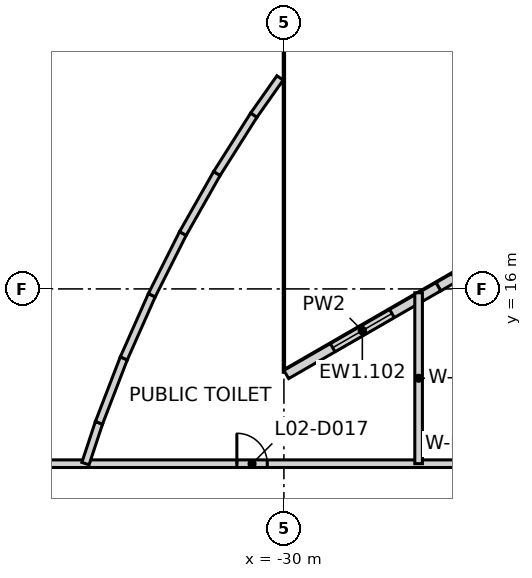
"""IFC4 building model, lengths in metres.
Left out: names, types, materials, properties, quantities, classifications, styles, units other than length and angle.
Written with IfcOpenShell. Run it as: python <this file> out.ifc"""

import sys

from ifc_helpers import new_model, si_unit, direction, frame, frame_2d, origin, place, context, subcontext, project, spatial, rectangle, extrude, element, fill, save


model = new_model("IFC4")
c1 = context("Model", 3, precision=1e-05, world=origin(), true_north=direction((0.0, 1.0)))
c2 = subcontext(c1, "Body", "Model", "MODEL_VIEW")
j1 = project(units=[si_unit("LENGTHUNIT", "METRE"), si_unit("PLANEANGLEUNIT", "RADIAN")], contexts=[c1])
p1 = place(None, origin())
s1 = spatial("IfcSite", under=j1, at=p1, CompositionType="ELEMENT")
p2 = place(p1, origin())
s2 = spatial("IfcBuilding", under=s1, at=p2, CompositionType="ELEMENT")
p3 = place(p2, frame((0.0, 0.0, 14.0)))
s3 = spatial("IfcBuildingStorey", under=s2, at=p3, CompositionType="ELEMENT", Elevation=14.0)
p4 = place(p3, frame((-25.936, 16.057, 0.0), z_axis=(0.0, 0.0, 1.0), x_axis=(0.866216377649, 0.499669077583, 0.0)))
e1 = element("IfcWall", 1, at=p4, inside=s3, PredefinedType="SOLIDWALL", context=c2, shape_type="SweptSolid", body=[
    extrude(rectangle(XDim=4.62, YDim=0.25, at=frame_2d((2.31, 0.0))), origin(), (0.0, 0.0, 1.0), 5.15),
])
p5 = place(p3, frame((-29.938, 13.748, 0.0), z_axis=(0.0, 0.0, 1.0), x_axis=(0.866193503994, 0.4997087288, 0.0)))
e2 = element("IfcWall", 2, at=p5, inside=s3, PredefinedType="SOLIDWALL", context=c2, shape_type="SweptSolid", body=[
    extrude(rectangle(XDim=4.62, YDim=0.25, at=frame_2d((2.31, 0.0))), origin(), (0.0, 0.0, 1.0), 5.15),
])
p6 = place(p5, frame((1.41, 0.0, 1.1)))
e3 = element("IfcOpeningElement", 3, at=p6, cuts=e2, PredefinedType="OPENING", context=c2, shape_type="SweptSolid", body=[
    extrude(rectangle(XDim=1.8, YDim=1.5, at=frame_2d((0.9, 0.75))), frame((0.0, 0.135, 0.0), z_axis=(0.0, -1.0, 0.0), x_axis=(1.0, 0.0, 0.0)), (0.0, 0.0, 1.0), 0.27),
])
p7 = place(p3, frame((-38.998, 11.401, 0.0), z_axis=(0.0, 0.0, 1.0), x_axis=(1.0, 0.0, 0.0)))
e4 = element("IfcWall", 4, at=p7, inside=s3, PredefinedType="PARTITIONING", context=c2, shape_type="SweptSolid", body=[
    extrude(rectangle(XDim=29.995, YDim=0.2, at=frame_2d((14.998, 0.0))), origin(), (0.0, 0.0, 1.0), 2.75),
])
p8 = place(p7, frame((25.143, 0.0, 0.0)))
e5 = element("IfcOpeningElement", 5, at=p8, cuts=e4, PredefinedType="OPENING", context=c2, shape_type="SweptSolid", body=[
    extrude(rectangle(XDim=1.0, YDim=2.1, at=frame_2d((0.5, 1.05))), frame((0.0, 0.11, 0.0), z_axis=(0.0, -1.0, 0.0), x_axis=(1.0, 0.0, 0.0)), (0.0, 0.0, 1.0), 0.22),
])
p9 = place(p7, frame((7.76, 0.0, 0.0)))
e6 = element("IfcOpeningElement", 6, at=p9, cuts=e4, PredefinedType="OPENING", context=c2, shape_type="SweptSolid", body=[
    extrude(rectangle(XDim=0.8, YDim=2.1, at=frame_2d((0.4, 1.05))), frame((0.0, 0.11, 0.0), z_axis=(0.0, -1.0, 0.0), x_axis=(1.0, 0.0, 0.0)), (0.0, 0.0, 1.0), 0.22),
])
p10 = place(p7, frame((16.034, 0.0, 0.0)))
e7 = element("IfcOpeningElement", 7, at=p10, cuts=e4, PredefinedType="OPENING", context=c2, shape_type="SweptSolid", body=[
    extrude(rectangle(XDim=0.9, YDim=2.1, at=frame_2d((0.45, 1.05))), frame((0.0, 0.11, 0.0), z_axis=(0.0, -1.0, 0.0), x_axis=(1.0, 0.0, 0.0)), (0.0, 0.0, 1.0), 0.22),
])
p11 = place(p3, frame((-35.221, 11.404, 0.0), z_axis=(0.0, 0.0, 1.0), x_axis=(0.313566613152, 0.949566205757, 0.0)))
e8 = element("IfcWall", 8, at=p11, inside=s3, PredefinedType="PARTITIONING", context=c2, shape_type="SweptSolid", body=[
    extrude(rectangle(XDim=1.129, YDim=0.2, at=frame_2d((0.564, 0.0))), origin(), (0.0, 0.0, 1.0), 5.15),
])
for number, where, z_axis, x_axis in (
    (9, (-34.867, 12.476, 0.0), (0.0, 0.0, 1.0), (0.36, 0.933, 0.0)),
    (10, (-34.213, 14.172, 0.0), (0.0, 0.0, 1.0), (0.405, 0.914, 0.0)),
):
    element("IfcWall", number, at=place(p3, frame(where, z_axis=z_axis, x_axis=x_axis)), inside=s3, PredefinedType="PARTITIONING", context=c2, shape_type="SweptSolid", body=[
        extrude(rectangle(XDim=1.818, YDim=0.2, at=frame_2d((0.909, 0.0))), origin(), (0.0, 0.0, 1.0), 5.15),
    ])
p12 = place(p3, frame((-33.476, 15.834, 0.0), z_axis=(0.0, 0.0, 1.0), x_axis=(0.449684007343, 0.893187714615, 0.0)))
e11 = element("IfcWall", 11, at=p12, inside=s3, PredefinedType="PARTITIONING", context=c2, shape_type="SweptSolid", body=[
    extrude(rectangle(XDim=1.817, YDim=0.2, at=frame_2d((0.909, 0.0))), origin(), (0.0, 0.0, 1.0), 5.15),
])
p13 = place(p3, frame((-32.659, 17.457, 0.0), z_axis=(0.0, 0.0, 1.0), x_axis=(0.493270284448, 0.86987609835, 0.0)))
e12 = element("IfcWall", 12, at=p13, inside=s3, PredefinedType="PARTITIONING", context=c2, shape_type="SweptSolid", body=[
    extrude(rectangle(XDim=1.816, YDim=0.2, at=frame_2d((0.908, 0.0))), origin(), (0.0, 0.0, 1.0), 5.15),
])
p14 = place(p3, frame((-31.763, 19.037, 0.0), z_axis=(0.0, 0.0, 1.0), x_axis=(0.534735678729, 0.84501938078, 0.0)))
e13 = element("IfcWall", 13, at=p14, inside=s3, PredefinedType="PARTITIONING", context=c2, shape_type="SweptSolid", body=[
    extrude(rectangle(XDim=1.818, YDim=0.2, at=frame_2d((0.909, 0.0))), origin(), (0.0, 0.0, 1.0), 5.15),
])
p15 = place(p3, frame((-30.791, 20.573, 0.0), z_axis=(0.0, 0.0, 1.0), x_axis=(0.575897739976, 0.817521738605, 0.0)))
e14 = element("IfcWall", 14, at=p15, inside=s3, PredefinedType="PARTITIONING", context=c2, shape_type="SweptSolid", body=[
    extrude(rectangle(XDim=1.196, YDim=0.2, at=frame_2d((0.598, 0.0))), origin(), (0.0, 0.0, 1.0), 5.15),
])
p16 = place(p3, frame((-26.456, 11.402, 0.0), z_axis=(0.0, 0.0, 1.0), x_axis=(0.0, 1.0, 0.0)))
e15 = element("IfcWall", 15, at=p16, inside=s3, PredefinedType="PARTITIONING", context=c2, shape_type="SweptSolid", body=[
    extrude(rectangle(XDim=4.495, YDim=0.2, at=frame_2d((2.248, 0.0))), origin(), (0.0, 0.0, 1.0), 5.15),
])
p17 = place(p3, frame((-25.509, 16.444, 0.0), z_axis=(0.0, 0.0, 1.0), x_axis=(0.840484744403, -0.541835209659, 0.0)))
e16 = element("IfcWall", 16, at=p17, inside=s3, PredefinedType="PARTITIONING", context=c2, shape_type="SweptSolid", body=[
    extrude(rectangle(XDim=9.305, YDim=0.2, at=frame_2d((4.653, 0.0))), origin(), (0.0, 0.0, 1.0), 2.75),
])
p18 = place(p6, origin())
e17 = element("IfcWindow", 17, at=p18, inside=s3, PartitioningType="SINGLE_PANEL", PredefinedType="WINDOW", context=c2, shape_type="SweptSolid", body=[
    extrude(rectangle(XDim=1.8, YDim=1.5, at=frame_2d((0.9, 0.75))), frame((0.0, 0.03, 0.0), z_axis=(0.0, -1.0, 0.0), x_axis=(1.0, 0.0, 0.0)), (0.0, 0.0, 1.0), 0.06),
])
fill(e3, e17)
p19 = place(p9, origin())
e18 = element("IfcDoor", 18, at=p19, inside=s3, OperationType="SINGLE_SWING_LEFT", PredefinedType="DOOR", context=c2, shape_type="SweptSolid", body=[
    extrude(rectangle(XDim=0.8, YDim=2.1, at=frame_2d((0.4, 1.05))), frame((0.0, 0.025, 0.0), z_axis=(0.0, -1.0, 0.0), x_axis=(1.0, 0.0, 0.0)), (0.0, 0.0, 1.0), 0.05),
])
fill(e6, e18)
save(model, sys.argv[1])
